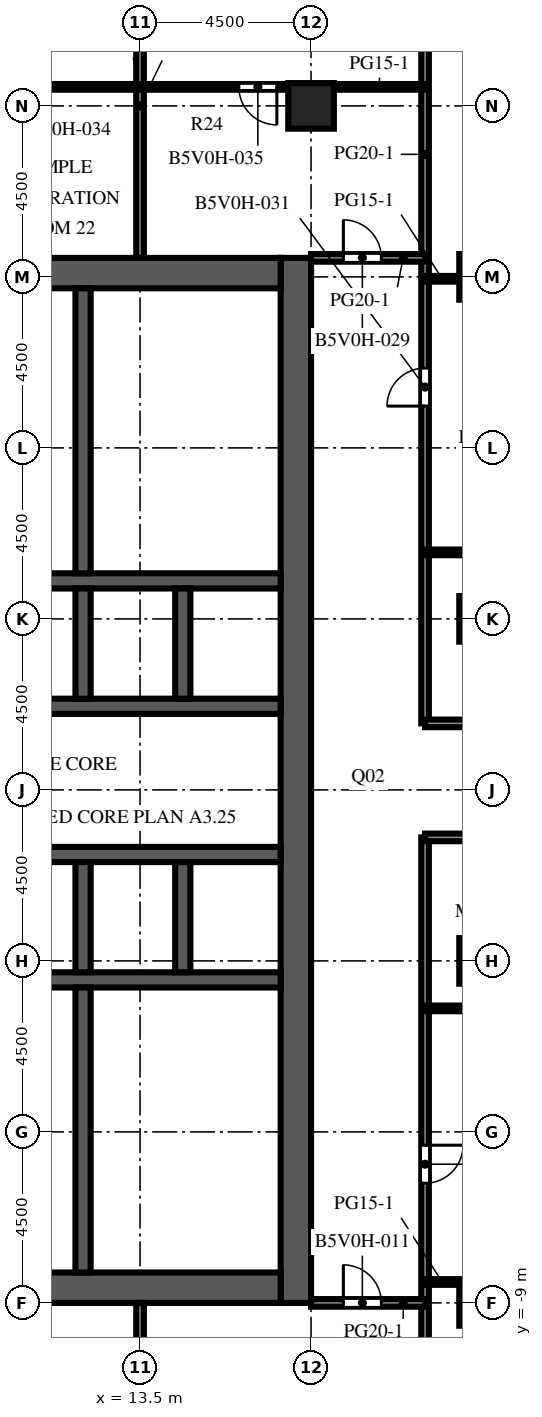
"""IFC4 building model, lengths in metres.
Left out: names, types, materials, properties, quantities, classifications, styles, units other than length and angle.
Written with IfcOpenShell. Run it as: python <this file> out.ifc"""

import sys

from ifc_helpers import new_model, si_unit, direction, frame, frame_2d, origin, origin_2d, place, context, subcontext, project, spatial, rectangle, extrude, element, fill, save


model = new_model("IFC4")
c1 = context("Model", 3, precision=1e-05, world=origin(), true_north=direction((0.0, 1.0)))
c2 = subcontext(c1, "Body", "Model", "MODEL_VIEW")
j1 = project(units=[si_unit("LENGTHUNIT", "METRE"), si_unit("PLANEANGLEUNIT", "RADIAN")], contexts=[c1])
p1 = place(None, origin())
s1 = spatial("IfcSite", under=j1, at=p1, CompositionType="ELEMENT")
p2 = place(p1, origin())
s2 = spatial("IfcBuilding", under=s1, at=p2, CompositionType="ELEMENT")
p3 = place(p2, frame((0.0, 0.0, 156.8)))
s3 = spatial("IfcBuildingStorey", under=s2, at=p3, CompositionType="ELEMENT", Elevation=156.8)
for number, where, z_axis, x_axis in (
    (1, (18.0, 22.5, 0.0), (0.0, 0.0, 1.0), (1.0, 0.0, 0.0)),
    (2, (22.5, -9.0, 0.0), (0.0, 0.0, 1.0), (1.0, 0.0, 0.0)),
    (3, (22.5, 0.0, 0.0), (0.0, 0.0, 1.0), (1.0, 0.0, 0.0)),
    (4, (22.5, 9.0, 0.0), (0.0, 0.0, 1.0), (1.0, 0.0, 0.0)),
    (5, (22.5, 18.0, 0.0), (0.0, 0.0, 1.0), (1.0, 0.0, 0.0)),
):
    element("IfcColumn", number, at=place(p3, frame(where, z_axis=z_axis, x_axis=x_axis)), inside=s3, PredefinedType="COLUMN", context=c2, shape_type="SweptSolid", body=[
        extrude(rectangle(XDim=1.2, YDim=1.2, at=origin_2d()), origin(), (0.0, 0.0, 1.0), 4.1),
    ])
p4 = place(p3, frame((17.6, -9.0, 0.0), z_axis=(0.0, 0.0, 1.0), x_axis=(0.0, 1.0, 0.0)))
e6 = element("IfcWall", 6, at=p4, inside=s3, PredefinedType="SHEAR", context=c2, shape_type="SweptSolid", body=[
    extrude(rectangle(XDim=27.5, YDim=0.8, at=frame_2d((13.75, 0.0))), origin(), (0.0, 0.0, 1.0), 4.1),
])
p5 = place(p4, frame((12.55, 0.0, 0.0)))
e7 = element("IfcOpeningElement", 7, at=p5, cuts=e6, PredefinedType="OPENING", context=c2, shape_type="SweptSolid", body=[
    extrude(rectangle(XDim=2.4, YDim=2.4, at=frame_2d((1.2, 1.2))), frame((0.0, 0.41, 0.0), z_axis=(0.0, -1.0, 0.0), x_axis=(1.0, 0.0, 0.0)), (0.0, 0.0, 1.0), 0.82),
])
p6 = place(p4, frame((6.825, 0.0, 0.0)))
e8 = element("IfcOpeningElement", 8, at=p6, cuts=e6, PredefinedType="OPENING", context=c2, shape_type="SweptSolid", body=[
    extrude(rectangle(XDim=1.2, YDim=2.1, at=frame_2d((0.6, 1.05))), frame((0.0, 0.41, 0.0), z_axis=(0.0, -1.0, 0.0), x_axis=(1.0, 0.0, 0.0)), (0.0, 0.0, 1.0), 0.82),
])
p7 = place(p4, frame((19.475, 0.0, 0.0)))
e9 = element("IfcOpeningElement", 9, at=p7, cuts=e6, PredefinedType="OPENING", context=c2, shape_type="SweptSolid", body=[
    extrude(rectangle(XDim=1.2, YDim=2.1, at=frame_2d((0.6, 1.05))), frame((0.0, 0.41, 0.0), z_axis=(0.0, -1.0, 0.0), x_axis=(1.0, 0.0, 0.0)), (0.0, 0.0, 1.0), 0.82),
])
for number, where, z_axis, x_axis in (
    (10, (6.8, -8.6, 0.0), (0.0, 0.0, 1.0), (1.0, 0.0, 0.0)),
    (11, (6.8, 18.1, 0.0), (0.0, 0.0, 1.0), (1.0, 0.0, 0.0)),
):
    element("IfcWall", number, at=place(p3, frame(where, z_axis=z_axis, x_axis=x_axis)), inside=s3, PredefinedType="SHEAR", context=c2, shape_type="SweptSolid", body=[
        extrude(rectangle(XDim=10.4, YDim=0.8, at=frame_2d((5.2, 0.0))), origin(), (0.0, 0.0, 1.0), 4.1),
    ])
p8 = place(p3, frame((6.8, -0.5, 0.0), z_axis=(0.0, 0.0, 1.0), x_axis=(1.0, 0.0, 0.0)))
e12 = element("IfcWall", 12, at=p8, inside=s3, PredefinedType="SHEAR", context=c2, shape_type="SweptSolid", body=[
    extrude(rectangle(XDim=10.4, YDim=0.4, at=frame_2d((5.2, 0.0))), origin(), (0.0, 0.0, 1.0), 4.1),
])
p9 = place(p3, frame((6.8, 2.8, 0.0), z_axis=(0.0, 0.0, 1.0), x_axis=(1.0, 0.0, 0.0)))
e13 = element("IfcWall", 13, at=p9, inside=s3, PredefinedType="SHEAR", context=c2, shape_type="SweptSolid", body=[
    extrude(rectangle(XDim=10.4, YDim=0.4, at=frame_2d((5.2, 0.0))), origin(), (0.0, 0.0, 1.0), 4.1),
])
p10 = place(p9, frame((0.738, 0.0, 0.0)))
e14 = element("IfcOpeningElement", 14, at=p10, cuts=e13, PredefinedType="OPENING", context=c2, shape_type="SweptSolid", body=[
    extrude(rectangle(XDim=1.1, YDim=2.1, at=frame_2d((0.55, 1.05))), frame((0.0, 0.21, 0.0), z_axis=(0.0, -1.0, 0.0), x_axis=(1.0, 0.0, 0.0)), (0.0, 0.0, 1.0), 0.42),
])
p11 = place(p9, frame((3.337, 0.0, 0.0)))
e15 = element("IfcOpeningElement", 15, at=p11, cuts=e13, PredefinedType="OPENING", context=c2, shape_type="SweptSolid", body=[
    extrude(rectangle(XDim=1.1, YDim=2.1, at=frame_2d((0.55, 1.05))), frame((0.0, 0.21, 0.0), z_axis=(0.0, -1.0, 0.0), x_axis=(1.0, 0.0, 0.0)), (0.0, 0.0, 1.0), 0.42),
])
p12 = place(p9, frame((6.012, 0.0, 0.0)))
e16 = element("IfcOpeningElement", 16, at=p12, cuts=e13, PredefinedType="OPENING", context=c2, shape_type="SweptSolid", body=[
    extrude(rectangle(XDim=1.0, YDim=2.1, at=frame_2d((0.5, 1.05))), frame((0.0, 0.21, 0.0), z_axis=(0.0, -1.0, 0.0), x_axis=(1.0, 0.0, 0.0)), (0.0, 0.0, 1.0), 0.42),
])
p13 = place(p9, frame((8.613, 0.0, 0.0)))
e17 = element("IfcOpeningElement", 17, at=p13, cuts=e13, PredefinedType="OPENING", context=c2, shape_type="SweptSolid", body=[
    extrude(rectangle(XDim=1.0, YDim=2.1, at=frame_2d((0.5, 1.05))), frame((0.0, 0.21, 0.0), z_axis=(0.0, -1.0, 0.0), x_axis=(1.0, 0.0, 0.0)), (0.0, 0.0, 1.0), 0.42),
])
p14 = place(p3, frame((6.8, 6.7, 0.0), z_axis=(0.0, 0.0, 1.0), x_axis=(1.0, 0.0, 0.0)))
e18 = element("IfcWall", 18, at=p14, inside=s3, PredefinedType="SHEAR", context=c2, shape_type="SweptSolid", body=[
    extrude(rectangle(XDim=10.4, YDim=0.4, at=frame_2d((5.2, 0.0))), origin(), (0.0, 0.0, 1.0), 4.1),
])
p15 = place(p14, frame((3.337, 0.0, 0.0)))
e19 = element("IfcOpeningElement", 19, at=p15, cuts=e18, PredefinedType="OPENING", context=c2, shape_type="SweptSolid", body=[
    extrude(rectangle(XDim=1.1, YDim=2.1, at=frame_2d((0.55, 1.05))), frame((0.0, 0.21, 0.0), z_axis=(0.0, -1.0, 0.0), x_axis=(1.0, 0.0, 0.0)), (0.0, 0.0, 1.0), 0.42),
])
p16 = place(p14, frame((5.962, 0.0, 0.0)))
e20 = element("IfcOpeningElement", 20, at=p16, cuts=e18, PredefinedType="OPENING", context=c2, shape_type="SweptSolid", body=[
    extrude(rectangle(XDim=1.1, YDim=2.1, at=frame_2d((0.55, 1.05))), frame((0.0, 0.21, 0.0), z_axis=(0.0, -1.0, 0.0), x_axis=(1.0, 0.0, 0.0)), (0.0, 0.0, 1.0), 0.42),
])
p17 = place(p14, frame((8.663, 0.0, 0.0)))
e21 = element("IfcOpeningElement", 21, at=p17, cuts=e18, PredefinedType="OPENING", context=c2, shape_type="SweptSolid", body=[
    extrude(rectangle(XDim=1.1, YDim=2.1, at=frame_2d((0.55, 1.05))), frame((0.0, 0.21, 0.0), z_axis=(0.0, -1.0, 0.0), x_axis=(1.0, 0.0, 0.0)), (0.0, 0.0, 1.0), 0.42),
])
p18 = place(p14, frame((0.688, 0.0, 0.0)))
e22 = element("IfcOpeningElement", 22, at=p18, cuts=e18, PredefinedType="OPENING", context=c2, shape_type="SweptSolid", body=[
    extrude(rectangle(XDim=1.0, YDim=2.1, at=frame_2d((0.5, 1.05))), frame((0.0, 0.21, 0.0), z_axis=(0.0, -1.0, 0.0), x_axis=(1.0, 0.0, 0.0)), (0.0, 0.0, 1.0), 0.42),
])
p19 = place(p3, frame((6.8, 10.0, 0.0), z_axis=(0.0, 0.0, 1.0), x_axis=(1.0, 0.0, 0.0)))
e23 = element("IfcWall", 23, at=p19, inside=s3, PredefinedType="SHEAR", context=c2, shape_type="SweptSolid", body=[
    extrude(rectangle(XDim=10.4, YDim=0.4, at=frame_2d((5.2, 0.0))), origin(), (0.0, 0.0, 1.0), 4.1),
])
for number, where, z_axis, x_axis in (
    (24, (12.0, -0.3, 0.0), (0.0, 0.0, 1.0), (0.0, 1.0, 0.0)),
    (25, (12.0, 6.9, 0.0), (0.0, 0.0, 1.0), (0.0, 1.0, 0.0)),
    (26, (14.625, -0.3, 0.0), (0.0, 0.0, 1.0), (0.0, 1.0, 0.0)),
    (27, (14.625, 6.9, 0.0), (0.0, 0.0, 1.0), (0.0, 1.0, 0.0)),
):
    element("IfcWall", number, at=place(p3, frame(where, z_axis=z_axis, x_axis=x_axis)), inside=s3, PredefinedType="SHEAR", context=c2, shape_type="SweptSolid", body=[
        extrude(rectangle(XDim=2.9, YDim=0.4, at=frame_2d((1.45, 0.0))), origin(), (0.0, 0.0, 1.0), 4.1),
    ])
for number, where, z_axis, x_axis in (
    (28, (12.0, -8.2, 0.0), (0.0, 0.0, 1.0), (0.0, 1.0, 0.0)),
    (29, (12.0, 10.2, 0.0), (0.0, 0.0, 1.0), (0.0, 1.0, 0.0)),
):
    element("IfcWall", number, at=place(p3, frame(where, z_axis=z_axis, x_axis=x_axis)), inside=s3, PredefinedType="SHEAR", context=c2, shape_type="SweptSolid", body=[
        extrude(rectangle(XDim=7.5, YDim=0.4, at=frame_2d((3.75, 0.0))), origin(), (0.0, 0.0, 1.0), 4.1),
    ])
for number, where, z_axis, x_axis in (
    (30, (8.3, -5.2, 0.0), (0.0, 0.0, 1.0), (1.0, 0.0, 0.0)),
    (31, (8.3, -2.95, 0.0), (0.0, 0.0, 1.0), (1.0, 0.0, 0.0)),
):
    element("IfcWall", number, at=place(p3, frame(where, z_axis=z_axis, x_axis=x_axis)), inside=s3, PredefinedType="PARTITIONING", context=c2, shape_type="SweptSolid", body=[
        extrude(rectangle(XDim=3.5, YDim=0.1, at=frame_2d((1.75, 0.0))), origin(), (0.0, 0.0, 1.0), 3.65),
    ])
for number, where, z_axis, x_axis in (
    (32, (6.8, 11.7, 0.0), (0.0, 0.0, 1.0), (1.0, 0.0, 0.0)),
    (33, (6.8, 13.575, 0.0), (0.0, 0.0, 1.0), (1.0, 0.0, 0.0)),
    (34, (6.8, 15.825, 0.0), (0.0, 0.0, 1.0), (1.0, 0.0, 0.0)),
):
    element("IfcWall", number, at=place(p3, frame(where, z_axis=z_axis, x_axis=x_axis)), inside=s3, PredefinedType="PARTITIONING", context=c2, shape_type="SweptSolid", body=[
        extrude(rectangle(XDim=5.0, YDim=0.1, at=frame_2d((2.5, 0.0))), origin(), (0.0, 0.0, 1.0), 3.65),
    ])
p20 = place(p3, frame((13.5, -22.0, 0.0), z_axis=(0.0, 0.0, 1.0), x_axis=(0.0, 1.0, 0.0)))
e35 = element("IfcWall", 35, at=p20, inside=s3, PredefinedType="PARTITIONING", context=c2, shape_type="SweptSolid", body=[
    extrude(rectangle(XDim=13.0, YDim=0.2, at=frame_2d((6.5, 0.0))), origin(), (0.0, 0.0, 1.0), 3.65),
])
p21 = place(p3, frame((13.5, 18.5, 0.0), z_axis=(0.0, 0.0, 1.0), x_axis=(0.0, 1.0, 0.0)))
e36 = element("IfcWall", 36, at=p21, inside=s3, PredefinedType="PARTITIONING", context=c2, shape_type="SweptSolid", body=[
    extrude(rectangle(XDim=8.0, YDim=0.2, at=frame_2d((4.0, 0.0))), origin(), (0.0, 0.0, 1.0), 3.65),
])
p22 = place(p3, frame((21.0, 3.25, 0.0), z_axis=(0.0, 0.0, 1.0), x_axis=(0.0, -1.0, 0.0)))
e37 = element("IfcWall", 37, at=p22, inside=s3, PredefinedType="PARTITIONING", context=c2, shape_type="SweptSolid", body=[
    extrude(rectangle(XDim=30.1, YDim=0.2, at=frame_2d((15.05, 0.0))), origin(), (0.0, 0.0, 1.0), 3.65),
])
p23 = place(p22, frame((8.1, 0.0, 0.0)))
e38 = element("IfcOpeningElement", 38, at=p23, cuts=e37, PredefinedType="OPENING", context=c2, shape_type="SweptSolid", body=[
    extrude(rectangle(XDim=1.0, YDim=2.1, at=frame_2d((0.5, 1.05))), frame((0.0, 0.11, 0.0), z_axis=(0.0, -1.0, 0.0), x_axis=(1.0, 0.0, 0.0)), (0.0, 0.0, 1.0), 0.22),
])
p24 = place(p3, frame((21.0, 26.85, 0.0), z_axis=(0.0, 0.0, 1.0), x_axis=(0.0, -1.0, 0.0)))
e39 = element("IfcWall", 39, at=p24, inside=s3, PredefinedType="PARTITIONING", context=c2, shape_type="SweptSolid", body=[
    extrude(rectangle(XDim=20.6, YDim=0.2, at=frame_2d((10.3, 0.0))), origin(), (0.0, 0.0, 1.0), 3.65),
])
p25 = place(p24, frame((11.25, 0.0, 0.0)))
e40 = element("IfcOpeningElement", 40, at=p25, cuts=e39, PredefinedType="OPENING", context=c2, shape_type="SweptSolid", body=[
    extrude(rectangle(XDim=1.0, YDim=2.1, at=frame_2d((0.5, 1.05))), frame((0.0, 0.11, 0.0), z_axis=(0.0, -1.0, 0.0), x_axis=(1.0, 0.0, 0.0)), (0.0, 0.0, 1.0), 0.22),
])
p26 = place(p3, frame((21.0, -9.0, 0.0), z_axis=(0.0, 0.0, 1.0), x_axis=(-1.0, 0.0, 0.0)))
e41 = element("IfcWall", 41, at=p26, inside=s3, PredefinedType="PARTITIONING", context=c2, shape_type="SweptSolid", body=[
    extrude(rectangle(XDim=3.0, YDim=0.2, at=frame_2d((1.5, 0.0))), origin(), (0.0, 0.0, 1.0), 3.65),
])
p27 = place(p26, frame((1.15, 0.0, 0.0)))
e42 = element("IfcOpeningElement", 42, at=p27, cuts=e41, PredefinedType="OPENING", context=c2, shape_type="SweptSolid", body=[
    extrude(rectangle(XDim=1.0, YDim=2.1, at=frame_2d((0.5, 1.05))), frame((0.0, 0.11, 0.0), z_axis=(0.0, -1.0, 0.0), x_axis=(1.0, 0.0, 0.0)), (0.0, 0.0, 1.0), 0.22),
])
p28 = place(p3, frame((21.0, -8.45, 0.0), z_axis=(0.0, 0.0, 1.0), x_axis=(1.0, 0.0, 0.0)))
e43 = element("IfcWall", 43, at=p28, inside=s3, PredefinedType="PARTITIONING", context=c2, shape_type="SweptSolid", body=[
    extrude(rectangle(XDim=0.9, YDim=0.15, at=frame_2d((0.45, 0.0))), origin(), (0.0, 0.0, 1.0), 3.65),
])
p29 = place(p3, frame((21.0, -1.25, 0.0), z_axis=(0.0, 0.0, 1.0), x_axis=(1.0, 0.0, 0.0)))
e44 = element("IfcWall", 44, at=p29, inside=s3, PredefinedType="PARTITIONING", context=c2, shape_type="SweptSolid", body=[
    extrude(rectangle(XDim=5.85, YDim=0.15, at=frame_2d((2.925, 0.0))), origin(), (0.0, 0.0, 1.0), 3.65),
])
p30 = place(p29, frame((3.1, 0.0, 0.0)))
e45 = element("IfcOpeningElement", 45, at=p30, cuts=e44, PredefinedType="OPENING", context=c2, shape_type="SweptSolid", body=[
    extrude(rectangle(XDim=1.0, YDim=2.1, at=frame_2d((0.5, 1.05))), frame((0.0, 0.085, 0.0), z_axis=(0.0, -1.0, 0.0), x_axis=(1.0, 0.0, 0.0)), (0.0, 0.0, 1.0), 0.17),
])
for number, where, z_axis, x_axis in (
    (46, (21.0, 3.25, 0.0), (0.0, 0.0, 1.0), (1.0, 0.0, 0.0)),
    (47, (21.0, 6.25, 0.0), (0.0, 0.0, 1.0), (1.0, 0.0, 0.0)),
):
    element("IfcWall", number, at=place(p3, frame(where, z_axis=z_axis, x_axis=x_axis)), inside=s3, PredefinedType="PARTITIONING", context=c2, shape_type="SweptSolid", body=[
        extrude(rectangle(XDim=5.85, YDim=0.2, at=frame_2d((2.925, 0.0))), origin(), (0.0, 0.0, 1.0), 3.65),
    ])
p31 = place(p3, frame((26.85, 10.75, 0.0), z_axis=(0.0, 0.0, 1.0), x_axis=(-1.0, 0.0, 0.0)))
e48 = element("IfcWall", 48, at=p31, inside=s3, PredefinedType="PARTITIONING", context=c2, shape_type="SweptSolid", body=[
    extrude(rectangle(XDim=5.85, YDim=0.15, at=frame_2d((2.925, 0.0))), origin(), (0.0, 0.0, 1.0), 3.65),
])
p32 = place(p31, frame((2.5, 0.0, 0.0)))
e49 = element("IfcOpeningElement", 49, at=p32, cuts=e48, PredefinedType="OPENING", context=c2, shape_type="SweptSolid", body=[
    extrude(rectangle(XDim=1.0, YDim=2.1, at=frame_2d((0.5, 1.05))), frame((0.0, 0.085, 0.0), z_axis=(0.0, -1.0, 0.0), x_axis=(1.0, 0.0, 0.0)), (0.0, 0.0, 1.0), 0.17),
])
p33 = place(p3, frame((21.0, 17.95, 0.0), z_axis=(0.0, 0.0, 1.0), x_axis=(1.0, 0.0, 0.0)))
e50 = element("IfcWall", 50, at=p33, inside=s3, PredefinedType="PARTITIONING", context=c2, shape_type="SweptSolid", body=[
    extrude(rectangle(XDim=0.9, YDim=0.15, at=frame_2d((0.45, 0.0))), origin(), (0.0, 0.0, 1.0), 3.65),
])
p34 = place(p3, frame((18.0, 18.5, 0.0), z_axis=(0.0, 0.0, 1.0), x_axis=(1.0, 0.0, 0.0)))
e51 = element("IfcWall", 51, at=p34, inside=s3, PredefinedType="PARTITIONING", context=c2, shape_type="SweptSolid", body=[
    extrude(rectangle(XDim=3.0, YDim=0.2, at=frame_2d((1.5, 0.0))), origin(), (0.0, 0.0, 1.0), 3.65),
])
p35 = place(p34, frame((0.85, 0.0, 0.0)))
e52 = element("IfcOpeningElement", 52, at=p35, cuts=e51, PredefinedType="OPENING", context=c2, shape_type="SweptSolid", body=[
    extrude(rectangle(XDim=1.0, YDim=2.1, at=frame_2d((0.5, 1.05))), frame((0.0, 0.11, 0.0), z_axis=(0.0, -1.0, 0.0), x_axis=(1.0, 0.0, 0.0)), (0.0, 0.0, 1.0), 0.22),
])
p36 = place(p3, frame((9.6, 23.0, 0.0), z_axis=(0.0, 0.0, 1.0), x_axis=(1.0, 0.0, 0.0)))
e53 = element("IfcWall", 53, at=p36, inside=s3, PredefinedType="PARTITIONING", context=c2, shape_type="SweptSolid", body=[
    extrude(rectangle(XDim=7.8, YDim=0.15, at=frame_2d((3.9, 0.0))), origin(), (0.0, 0.0, 1.0), 3.65),
])
p37 = place(p36, frame((0.25, 0.0, 0.0)))
e54 = element("IfcOpeningElement", 54, at=p37, cuts=e53, PredefinedType="OPENING", context=c2, shape_type="SweptSolid", body=[
    extrude(rectangle(XDim=1.0, YDim=2.1, at=frame_2d((0.5, 1.05))), frame((0.0, 0.085, 0.0), z_axis=(0.0, -1.0, 0.0), x_axis=(1.0, 0.0, 0.0)), (0.0, 0.0, 1.0), 0.17),
])
p38 = place(p36, frame((6.5, 0.0, 0.0)))
e55 = element("IfcOpeningElement", 55, at=p38, cuts=e53, PredefinedType="OPENING", context=c2, shape_type="SweptSolid", body=[
    extrude(rectangle(XDim=1.0, YDim=2.1, at=frame_2d((0.5, 1.05))), frame((0.0, 0.085, 0.0), z_axis=(0.0, -1.0, 0.0), x_axis=(1.0, 0.0, 0.0)), (0.0, 0.0, 1.0), 0.17),
])
p39 = place(p3, frame((18.6, 23.0, 0.0), z_axis=(0.0, 0.0, 1.0), x_axis=(1.0, 0.0, 0.0)))
e56 = element("IfcWall", 56, at=p39, inside=s3, PredefinedType="PARTITIONING", context=c2, shape_type="SweptSolid", body=[
    extrude(rectangle(XDim=2.4, YDim=0.15, at=frame_2d((1.2, 0.0))), origin(), (0.0, 0.0, 1.0), 3.65),
])
p40 = place(p11, origin())
e57 = element("IfcDoor", 57, at=p40, inside=s3, OperationType="DOUBLE_DOOR_SLIDING", PredefinedType="DOOR", context=c2, shape_type="SweptSolid", body=[
    extrude(rectangle(XDim=1.1, YDim=2.1, at=frame_2d((0.55, 1.05))), frame((0.0, 0.025, 0.0), z_axis=(0.0, -1.0, 0.0), x_axis=(1.0, 0.0, 0.0)), (0.0, 0.0, 1.0), 0.05),
])
fill(e15, e57)
p41 = place(p15, origin())
e58 = element("IfcDoor", 58, at=p41, inside=s3, OperationType="DOUBLE_DOOR_SLIDING", PredefinedType="DOOR", context=c2, shape_type="SweptSolid", body=[
    extrude(rectangle(XDim=1.1, YDim=2.1, at=frame_2d((0.55, 1.05))), frame((0.0, 0.025, 0.0), z_axis=(0.0, -1.0, 0.0), x_axis=(1.0, 0.0, 0.0)), (0.0, 0.0, 1.0), 0.05),
])
fill(e19, e58)
p42 = place(p16, origin())
e59 = element("IfcDoor", 59, at=p42, inside=s3, OperationType="DOUBLE_DOOR_SLIDING", PredefinedType="DOOR", context=c2, shape_type="SweptSolid", body=[
    extrude(rectangle(XDim=1.1, YDim=2.1, at=frame_2d((0.55, 1.05))), frame((0.0, 0.025, 0.0), z_axis=(0.0, -1.0, 0.0), x_axis=(1.0, 0.0, 0.0)), (0.0, 0.0, 1.0), 0.05),
])
fill(e20, e59)
p43 = place(p17, origin())
e60 = element("IfcDoor", 60, at=p43, inside=s3, OperationType="DOUBLE_DOOR_SLIDING", PredefinedType="DOOR", context=c2, shape_type="SweptSolid", body=[
    extrude(rectangle(XDim=1.1, YDim=2.1, at=frame_2d((0.55, 1.05))), frame((0.0, 0.025, 0.0), z_axis=(0.0, -1.0, 0.0), x_axis=(1.0, 0.0, 0.0)), (0.0, 0.0, 1.0), 0.05),
])
fill(e21, e60)
p44 = place(p5, origin())
e61 = element("IfcDoor", 61, at=p44, inside=s3, OperationType="DOUBLE_DOOR_DOUBLE_SWING", PredefinedType="DOOR", context=c2, shape_type="SweptSolid", body=[
    extrude(rectangle(XDim=2.4, YDim=2.4, at=frame_2d((1.2, 1.2))), frame((0.0, 0.025, 0.0), z_axis=(0.0, -1.0, 0.0), x_axis=(1.0, 0.0, 0.0)), (0.0, 0.0, 1.0), 0.05),
])
fill(e7, e61)
p45 = place(p6, frame((1.2, 0.0, 0.0), z_axis=(0.0, 0.0, 1.0), x_axis=(-1.0, 0.0, 0.0)))
e62 = element("IfcDoor", 62, at=p45, inside=s3, OperationType="SINGLE_SWING_LEFT", PredefinedType="DOOR", context=c2, shape_type="SweptSolid", body=[
    extrude(rectangle(XDim=1.2, YDim=2.1, at=frame_2d((0.6, 1.05))), frame((0.0, 0.025, 0.0), z_axis=(0.0, -1.0, 0.0), x_axis=(1.0, 0.0, 0.0)), (0.0, 0.0, 1.0), 0.05),
])
fill(e8, e62)
p46 = place(p7, frame((1.2, 0.0, 0.0), z_axis=(0.0, 0.0, 1.0), x_axis=(-1.0, 0.0, 0.0)))
e63 = element("IfcDoor", 63, at=p46, inside=s3, OperationType="SINGLE_SWING_LEFT", PredefinedType="DOOR", context=c2, shape_type="SweptSolid", body=[
    extrude(rectangle(XDim=1.2, YDim=2.1, at=frame_2d((0.6, 1.05))), frame((0.0, 0.025, 0.0), z_axis=(0.0, -1.0, 0.0), x_axis=(1.0, 0.0, 0.0)), (0.0, 0.0, 1.0), 0.05),
])
fill(e9, e63)
p47 = place(p12, origin())
e64 = element("IfcDoor", 64, at=p47, inside=s3, OperationType="SINGLE_SWING_LEFT", PredefinedType="DOOR", context=c2, shape_type="SweptSolid", body=[
    extrude(rectangle(XDim=1.0, YDim=2.1, at=frame_2d((0.5, 1.05))), frame((0.0, 0.025, 0.0), z_axis=(0.0, -1.0, 0.0), x_axis=(1.0, 0.0, 0.0)), (0.0, 0.0, 1.0), 0.05),
])
fill(e16, e64)
p48 = place(p13, origin())
e65 = element("IfcDoor", 65, at=p48, inside=s3, OperationType="SINGLE_SWING_RIGHT", PredefinedType="DOOR", context=c2, shape_type="SweptSolid", body=[
    extrude(rectangle(XDim=1.0, YDim=2.1, at=frame_2d((0.5, 1.05))), frame((0.0, 0.025, 0.0), z_axis=(0.0, -1.0, 0.0), x_axis=(1.0, 0.0, 0.0)), (0.0, 0.0, 1.0), 0.05),
])
fill(e17, e65)
p49 = place(p27, origin())
e66 = element("IfcDoor", 66, at=p49, inside=s3, OperationType="SINGLE_SWING_RIGHT", PredefinedType="DOOR", context=c2, shape_type="SweptSolid", body=[
    extrude(rectangle(XDim=1.0, YDim=2.1, at=frame_2d((0.5, 1.05))), frame((0.0, 0.025, 0.0), z_axis=(0.0, -1.0, 0.0), x_axis=(1.0, 0.0, 0.0)), (0.0, 0.0, 1.0), 0.05),
])
fill(e42, e66)
p50 = place(p35, origin())
e67 = element("IfcDoor", 67, at=p50, inside=s3, OperationType="SINGLE_SWING_LEFT", PredefinedType="DOOR", context=c2, shape_type="SweptSolid", body=[
    extrude(rectangle(XDim=1.0, YDim=2.1, at=frame_2d((0.5, 1.05))), frame((0.0, 0.025, 0.0), z_axis=(0.0, -1.0, 0.0), x_axis=(1.0, 0.0, 0.0)), (0.0, 0.0, 1.0), 0.05),
])
fill(e52, e67)
p51 = place(p23, origin())
e68 = element("IfcDoor", 68, at=p51, inside=s3, OperationType="SINGLE_SWING_LEFT", PredefinedType="DOOR", context=c2, shape_type="SweptSolid", body=[
    extrude(rectangle(XDim=1.0, YDim=2.1, at=frame_2d((0.5, 1.05))), frame((0.0, 0.025, 0.0), z_axis=(0.0, -1.0, 0.0), x_axis=(1.0, 0.0, 0.0)), (0.0, 0.0, 1.0), 0.05),
])
fill(e38, e68)
p52 = place(p25, origin())
e69 = element("IfcDoor", 69, at=p52, inside=s3, OperationType="SINGLE_SWING_RIGHT", PredefinedType="DOOR", context=c2, shape_type="SweptSolid", body=[
    extrude(rectangle(XDim=1.0, YDim=2.1, at=frame_2d((0.5, 1.05))), frame((0.0, 0.025, 0.0), z_axis=(0.0, -1.0, 0.0), x_axis=(1.0, 0.0, 0.0)), (0.0, 0.0, 1.0), 0.05),
])
fill(e40, e69)
p53 = place(p38, origin())
e70 = element("IfcDoor", 70, at=p53, inside=s3, OperationType="SINGLE_SWING_RIGHT", PredefinedType="DOOR", context=c2, shape_type="SweptSolid", body=[
    extrude(rectangle(XDim=1.0, YDim=2.1, at=frame_2d((0.5, 1.05))), frame((0.0, 0.025, 0.0), z_axis=(0.0, -1.0, 0.0), x_axis=(1.0, 0.0, 0.0)), (0.0, 0.0, 1.0), 0.05),
])
fill(e55, e70)
save(model, sys.argv[1])
